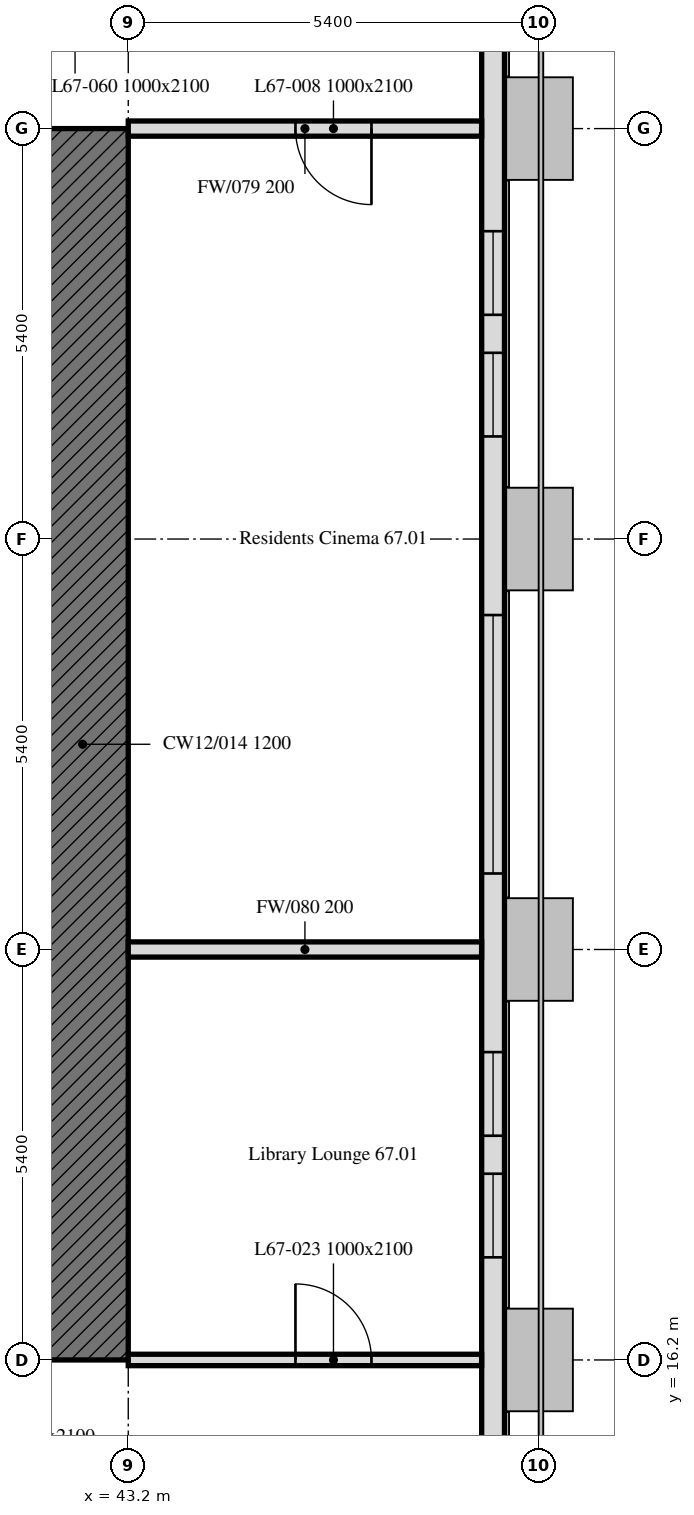
"""IFC4 building model, lengths in metres.
Left out: names, types, materials, properties, quantities, classifications, styles, units other than length and angle.
Written with IfcOpenShell. Run it as: python <this file> out.ifc"""

import sys

from ifc_helpers import new_model, si_unit, direction, frame, frame_2d, origin, place, context, subcontext, project, spatial, rectangle, extrude, element, fill, save


model = new_model("IFC4")
c1 = context("Model", 3, precision=1e-05, world=origin(), true_north=direction((0.0, 1.0)))
c2 = subcontext(c1, "Body", "Model", "MODEL_VIEW")
j1 = project(units=[si_unit("LENGTHUNIT", "METRE"), si_unit("PLANEANGLEUNIT", "RADIAN")], contexts=[c1])
p1 = place(None, origin())
s1 = spatial("IfcSite", under=j1, at=p1, CompositionType="ELEMENT")
p2 = place(p1, origin())
s2 = spatial("IfcBuilding", under=s1, at=p2, CompositionType="ELEMENT")
p3 = place(p2, frame((0.0, 0.0, 275.2)))
s3 = spatial("IfcBuildingStorey", under=s2, at=p3, CompositionType="ELEMENT", Elevation=275.2)
p4 = place(p3, frame((48.0, 5.586, 0.0), z_axis=(0.0, 0.0, 1.0), x_axis=(0.0, 1.0, 0.0)))
e1 = element("IfcWall", 1, at=p4, inside=s3, PredefinedType="SOLIDWALL", context=c2, shape_type="SweptSolid", body=[
    extrude(rectangle(XDim=32.027, YDim=0.3, at=frame_2d((16.014, 0.0))), origin(), (0.0, 0.0, 1.0), 3.0),
])
p5 = place(p4, frame((1.789, 0.0, 0.9)))
e2 = element("IfcOpeningElement", 2, at=p5, cuts=e1, PredefinedType="OPENING", context=c2, shape_type="SweptSolid", body=[
    extrude(rectangle(XDim=0.65, YDim=1.7, at=frame_2d((0.325, 0.85))), frame((0.0, 0.16, 0.0), z_axis=(0.0, -1.0, 0.0), x_axis=(1.0, 0.0, 0.0)), (0.0, 0.0, 1.0), 0.32),
])
p6 = place(p4, frame((2.764, 0.0, 0.9)))
e3 = element("IfcOpeningElement", 3, at=p6, cuts=e1, PredefinedType="OPENING", context=c2, shape_type="SweptSolid", body=[
    extrude(rectangle(XDim=1.1, YDim=1.7, at=frame_2d((0.55, 0.85))), frame((0.0, 0.16, 0.0), z_axis=(0.0, -1.0, 0.0), x_axis=(1.0, 0.0, 0.0)), (0.0, 0.0, 1.0), 0.32),
])
p7 = place(p4, frame((6.564, 0.0, 0.9)))
e4 = element("IfcOpeningElement", 4, at=p7, cuts=e1, PredefinedType="OPENING", context=c2, shape_type="SweptSolid", body=[
    extrude(rectangle(XDim=1.1, YDim=1.7, at=frame_2d((0.55, 0.85))), frame((0.0, 0.16, 0.0), z_axis=(0.0, -1.0, 0.0), x_axis=(1.0, 0.0, 0.0)), (0.0, 0.0, 1.0), 0.32),
])
p8 = place(p4, frame((7.989, 0.0, 0.9)))
e5 = element("IfcOpeningElement", 5, at=p8, cuts=e1, PredefinedType="OPENING", context=c2, shape_type="SweptSolid", body=[
    extrude(rectangle(XDim=0.65, YDim=1.7, at=frame_2d((0.325, 0.85))), frame((0.0, 0.16, 0.0), z_axis=(0.0, -1.0, 0.0), x_axis=(1.0, 0.0, 0.0)), (0.0, 0.0, 1.0), 0.32),
])
p9 = place(p4, frame((11.964, 0.0, 0.9)))
e6 = element("IfcOpeningElement", 6, at=p9, cuts=e1, PredefinedType="OPENING", context=c2, shape_type="SweptSolid", body=[
    extrude(rectangle(XDim=1.1, YDim=1.7, at=frame_2d((0.55, 0.85))), frame((0.0, 0.16, 0.0), z_axis=(0.0, -1.0, 0.0), x_axis=(1.0, 0.0, 0.0)), (0.0, 0.0, 1.0), 0.32),
])
p10 = place(p4, frame((13.564, 0.0, 0.9)))
e7 = element("IfcOpeningElement", 7, at=p10, cuts=e1, PredefinedType="OPENING", context=c2, shape_type="SweptSolid", body=[
    extrude(rectangle(XDim=1.1, YDim=1.7, at=frame_2d((0.55, 0.85))), frame((0.0, 0.16, 0.0), z_axis=(0.0, -1.0, 0.0), x_axis=(1.0, 0.0, 0.0)), (0.0, 0.0, 1.0), 0.32),
])
p11 = place(p4, frame((17.014, 0.0, 0.9)))
e8 = element("IfcOpeningElement", 8, at=p11, cuts=e1, PredefinedType="OPENING", context=c2, shape_type="SweptSolid", body=[
    extrude(rectangle(XDim=3.4, YDim=1.7, at=frame_2d((1.7, 0.85))), frame((0.0, 0.16, 0.0), z_axis=(0.0, -1.0, 0.0), x_axis=(1.0, 0.0, 0.0)), (0.0, 0.0, 1.0), 0.32),
])
p12 = place(p4, frame((22.764, 0.0, 0.9)))
e9 = element("IfcOpeningElement", 9, at=p12, cuts=e1, PredefinedType="OPENING", context=c2, shape_type="SweptSolid", body=[
    extrude(rectangle(XDim=1.1, YDim=1.7, at=frame_2d((0.55, 0.85))), frame((0.0, 0.16, 0.0), z_axis=(0.0, -1.0, 0.0), x_axis=(1.0, 0.0, 0.0)), (0.0, 0.0, 1.0), 0.32),
])
p13 = place(p4, frame((24.364, 0.0, 0.9)))
e10 = element("IfcOpeningElement", 10, at=p13, cuts=e1, PredefinedType="OPENING", context=c2, shape_type="SweptSolid", body=[
    extrude(rectangle(XDim=1.1, YDim=1.7, at=frame_2d((0.55, 0.85))), frame((0.0, 0.16, 0.0), z_axis=(0.0, -1.0, 0.0), x_axis=(1.0, 0.0, 0.0)), (0.0, 0.0, 1.0), 0.32),
])
p14 = place(p4, frame((28.789, 0.0, 0.9)))
e11 = element("IfcOpeningElement", 11, at=p14, cuts=e1, PredefinedType="OPENING", context=c2, shape_type="SweptSolid", body=[
    extrude(rectangle(XDim=0.65, YDim=1.7, at=frame_2d((0.325, 0.85))), frame((0.0, 0.16, 0.0), z_axis=(0.0, -1.0, 0.0), x_axis=(1.0, 0.0, 0.0)), (0.0, 0.0, 1.0), 0.32),
])
p15 = place(p4, frame((29.764, 0.0, 0.9)))
e12 = element("IfcOpeningElement", 12, at=p15, cuts=e1, PredefinedType="OPENING", context=c2, shape_type="SweptSolid", body=[
    extrude(rectangle(XDim=1.1, YDim=1.7, at=frame_2d((0.55, 0.85))), frame((0.0, 0.16, 0.0), z_axis=(0.0, -1.0, 0.0), x_axis=(1.0, 0.0, 0.0)), (0.0, 0.0, 1.0), 0.32),
])
p16 = place(p3, frame((42.6, 32.4, 0.0), z_axis=(0.0, 0.0, 1.0), x_axis=(0.0, -1.0, 0.0)))
e13 = element("IfcWall", 13, at=p16, inside=s3, PredefinedType="SOLIDWALL", context=c2, shape_type="SweptSolid", body=[
    extrude(rectangle(XDim=16.2, YDim=1.2, at=frame_2d((8.1, 0.0))), origin(), (0.0, 0.0, 1.0), 3.0),
])
p17 = place(p3, frame((47.849, 32.4, 0.0), z_axis=(0.0, 0.0, 1.0), x_axis=(-1.0, 0.0, 0.0)))
e14 = element("IfcWall", 14, at=p17, inside=s3, PredefinedType="PARTITIONING", context=c2, shape_type="SweptSolid", body=[
    extrude(rectangle(XDim=4.649, YDim=0.2, at=frame_2d((2.325, 0.0))), origin(), (0.0, 0.0, 1.0), 2.4),
])
p18 = place(p17, frame((1.449, 0.0, 0.0)))
e15 = element("IfcOpeningElement", 15, at=p18, cuts=e14, PredefinedType="OPENING", context=c2, shape_type="SweptSolid", body=[
    extrude(rectangle(XDim=1.0, YDim=2.1, at=frame_2d((0.5, 1.05))), frame((0.0, 0.1, 0.0), z_axis=(0.0, -1.0, 0.0), x_axis=(1.0, 0.0, 0.0)), (0.0, 0.0, 1.0), 0.2),
])
p19 = place(p3, frame((43.2, 21.6, 0.0), z_axis=(0.0, 0.0, 1.0), x_axis=(1.0, 0.0, 0.0)))
e16 = element("IfcWall", 16, at=p19, inside=s3, PredefinedType="PARTITIONING", context=c2, shape_type="SweptSolid", body=[
    extrude(rectangle(XDim=4.649, YDim=0.2, at=frame_2d((2.325, 0.0))), origin(), (0.0, 0.0, 1.0), 2.4),
])
p20 = place(p3, frame((43.2, 16.2, 0.0), z_axis=(0.0, 0.0, 1.0), x_axis=(1.0, 0.0, 0.0)))
e17 = element("IfcWall", 17, at=p20, inside=s3, PredefinedType="PARTITIONING", context=c2, shape_type="SweptSolid", body=[
    extrude(rectangle(XDim=4.649, YDim=0.15, at=frame_2d((2.325, 0.0))), origin(), (0.0, 0.0, 1.0), 2.4),
])
p21 = place(p20, frame((2.2, 0.0, 0.0)))
e18 = element("IfcOpeningElement", 18, at=p21, cuts=e17, PredefinedType="OPENING", context=c2, shape_type="SweptSolid", body=[
    extrude(rectangle(XDim=1.0, YDim=2.1, at=frame_2d((0.5, 1.05))), frame((0.0, 0.075, 0.0), z_axis=(0.0, -1.0, 0.0), x_axis=(1.0, 0.0, 0.0)), (0.0, 0.0, 1.0), 0.15),
])
p22 = place(p9, origin())
e19 = element("IfcWindow", 19, at=p22, inside=s3, PartitioningType="SINGLE_PANEL", PredefinedType="WINDOW", context=c2, shape_type="SweptSolid", body=[
    extrude(rectangle(XDim=1.1, YDim=1.7, at=frame_2d((0.55, 0.85))), frame((0.0, 0.03, 0.0), z_axis=(0.0, -1.0, 0.0), x_axis=(1.0, 0.0, 0.0)), (0.0, 0.0, 1.0), 0.06),
])
fill(e6, e19)
p23 = place(p10, origin())
e20 = element("IfcWindow", 20, at=p23, inside=s3, PartitioningType="SINGLE_PANEL", PredefinedType="WINDOW", context=c2, shape_type="SweptSolid", body=[
    extrude(rectangle(XDim=1.1, YDim=1.7, at=frame_2d((0.55, 0.85))), frame((0.0, 0.03, 0.0), z_axis=(0.0, -1.0, 0.0), x_axis=(1.0, 0.0, 0.0)), (0.0, 0.0, 1.0), 0.06),
])
fill(e7, e20)
p24 = place(p11, origin())
e21 = element("IfcWindow", 21, at=p24, inside=s3, PartitioningType="SINGLE_PANEL", PredefinedType="WINDOW", context=c2, shape_type="SweptSolid", body=[
    extrude(rectangle(XDim=3.4, YDim=1.7, at=frame_2d((1.7, 0.85))), frame((0.0, 0.03, 0.0), z_axis=(0.0, -1.0, 0.0), x_axis=(1.0, 0.0, 0.0)), (0.0, 0.0, 1.0), 0.06),
])
fill(e8, e21)
p25 = place(p12, origin())
e22 = element("IfcWindow", 22, at=p25, inside=s3, PartitioningType="SINGLE_PANEL", PredefinedType="WINDOW", context=c2, shape_type="SweptSolid", body=[
    extrude(rectangle(XDim=1.1, YDim=1.7, at=frame_2d((0.55, 0.85))), frame((0.0, 0.03, 0.0), z_axis=(0.0, -1.0, 0.0), x_axis=(1.0, 0.0, 0.0)), (0.0, 0.0, 1.0), 0.06),
])
fill(e9, e22)
p26 = place(p13, origin())
e23 = element("IfcWindow", 23, at=p26, inside=s3, PartitioningType="SINGLE_PANEL", PredefinedType="WINDOW", context=c2, shape_type="SweptSolid", body=[
    extrude(rectangle(XDim=1.1, YDim=1.7, at=frame_2d((0.55, 0.85))), frame((0.0, 0.03, 0.0), z_axis=(0.0, -1.0, 0.0), x_axis=(1.0, 0.0, 0.0)), (0.0, 0.0, 1.0), 0.06),
])
fill(e10, e23)
p27 = place(p18, origin())
e24 = element("IfcDoor", 24, at=p27, inside=s3, OperationType="SINGLE_SWING_RIGHT", PredefinedType="DOOR", context=c2, shape_type="SweptSolid", body=[
    extrude(rectangle(XDim=1.0, YDim=2.1, at=frame_2d((0.5, 1.05))), frame((0.0, 0.025, 0.0), z_axis=(0.0, -1.0, 0.0), x_axis=(1.0, 0.0, 0.0)), (0.0, 0.0, 1.0), 0.05),
])
fill(e15, e24)
p28 = place(p21, origin())
e25 = element("IfcDoor", 25, at=p28, inside=s3, OperationType="SINGLE_SWING_RIGHT", PredefinedType="DOOR", context=c2, shape_type="SweptSolid", body=[
    extrude(rectangle(XDim=1.0, YDim=2.1, at=frame_2d((0.5, 1.05))), frame((0.0, 0.025, 0.0), z_axis=(0.0, -1.0, 0.0), x_axis=(1.0, 0.0, 0.0)), (0.0, 0.0, 1.0), 0.05),
])
fill(e18, e25)
save(model, sys.argv[1])
